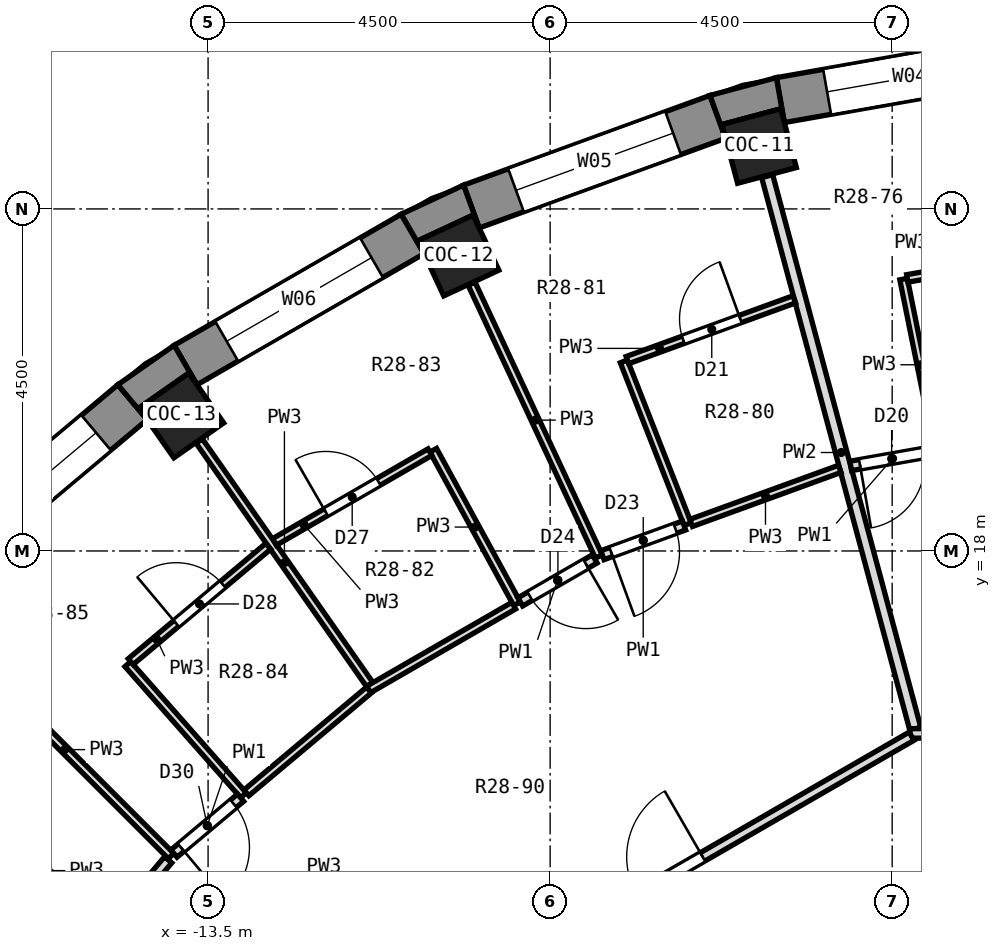
"""IFC4 building model, lengths in metres.
Left out: names, types, materials, properties, quantities, classifications, styles, units other than length and angle.
Written with IfcOpenShell. Run it as: python <this file> out.ifc"""

import sys

from ifc_helpers import new_model, si_unit, direction, frame, frame_2d, origin, origin_2d, place, context, subcontext, project, spatial, polyline, rectangle, outline, extrude, element, fill, save


model = new_model("IFC4")
c1 = context("Model", 3, precision=1e-05, world=origin(), true_north=direction((0.0, 1.0)))
c2 = subcontext(c1, "Body", "Model", "MODEL_VIEW")
j1 = project(units=[si_unit("LENGTHUNIT", "METRE"), si_unit("PLANEANGLEUNIT", "RADIAN")], contexts=[c1])
p1 = place(None, origin())
s1 = spatial("IfcSite", under=j1, at=p1, CompositionType="ELEMENT")
p2 = place(p1, origin())
s2 = spatial("IfcBuilding", under=s1, at=p2, CompositionType="ELEMENT")
p3 = place(p2, frame((0.0, 0.0, 190.5)))
s3 = spatial("IfcBuildingStorey", under=s2, at=p3, CompositionType="ELEMENT", Elevation=190.5)
for number, where, z_axis, x_axis in (
    (1, (-6.25, 23.327, 0.0), (0.0, 0.0, 1.0), (-0.259, 0.966, 0.0)),
    (2, (-10.206, 21.887, 0.0), (0.0, 0.0, 1.0), (-0.423, 0.906, 0.0)),
    (3, (-13.852, 19.782, 0.0), (0.0, 0.0, 1.0), (-0.574, 0.819, 0.0)),
):
    element("IfcColumn", number, at=place(p3, frame(where, z_axis=z_axis, x_axis=x_axis)), inside=s3, PredefinedType="COLUMN", context=c2, shape_type="SweptSolid", body=[
        extrude(rectangle(XDim=0.8, YDim=0.8, at=origin_2d()), origin(), (0.0, 0.0, 1.0), 3.3),
    ])
p4 = place(p3, frame((-2.574, 24.531, 0.0), z_axis=(0.0, 0.0, 1.0), x_axis=(-0.984814892183, -0.173607684551, 0.0)))
e4 = element("IfcWall", 4, at=p4, inside=s3, PredefinedType="SOLIDWALL", context=c2, shape_type="SweptSolid", body=[
    extrude(rectangle(XDim=3.45, YDim=0.6, at=frame_2d((1.725, 0.0))), origin(), (0.0, 0.0, 1.0), 2.85),
])
p5 = place(p4, frame((0.625, 0.0, 0.9)))
e5 = element("IfcOpeningElement", 5, at=p5, cuts=e4, PredefinedType="OPENING", context=c2, shape_type="SweptSolid", body=[
    extrude(rectangle(XDim=2.2, YDim=1.8, at=frame_2d((1.1, 0.9))), frame((0.0, 0.312, 0.0), z_axis=(0.0, -1.0, 0.0), x_axis=(1.0, 0.0, 0.0)), (0.0, 0.0, 1.0), 0.624),
])
p6 = place(p3, frame((-6.794, 23.711, 0.0), z_axis=(0.0, 0.0, 1.0), x_axis=(-0.93968799822, -0.342032843455, 0.0)))
e6 = element("IfcWall", 6, at=p6, inside=s3, PredefinedType="SOLIDWALL", context=c2, shape_type="SweptSolid", body=[
    extrude(rectangle(XDim=3.45, YDim=0.6, at=frame_2d((1.725, 0.0))), origin(), (0.0, 0.0, 1.0), 2.85),
])
p7 = place(p6, frame((0.625, 0.0, 0.9)))
e7 = element("IfcOpeningElement", 7, at=p7, cuts=e6, PredefinedType="OPENING", context=c2, shape_type="SweptSolid", body=[
    extrude(rectangle(XDim=2.2, YDim=1.8, at=frame_2d((1.1, 0.9))), frame((0.0, 0.312, 0.0), z_axis=(0.0, -1.0, 0.0), x_axis=(1.0, 0.0, 0.0)), (0.0, 0.0, 1.0), 0.624),
])
p8 = place(p3, frame((-10.809, 22.171, 0.0), z_axis=(0.0, 0.0, 1.0), x_axis=(-0.86602648383, -0.499998129301, 0.0)))
e8 = element("IfcWall", 8, at=p8, inside=s3, PredefinedType="SOLIDWALL", context=c2, shape_type="SweptSolid", body=[
    extrude(rectangle(XDim=3.45, YDim=0.6, at=frame_2d((1.725, 0.0))), origin(), (0.0, 0.0, 1.0), 2.85),
])
p9 = place(p8, frame((0.625, 0.0, 0.9)))
e9 = element("IfcOpeningElement", 9, at=p9, cuts=e8, PredefinedType="OPENING", context=c2, shape_type="SweptSolid", body=[
    extrude(rectangle(XDim=2.2, YDim=1.8, at=frame_2d((1.1, 0.9))), frame((0.0, 0.312, 0.0), z_axis=(0.0, -1.0, 0.0), x_axis=(1.0, 0.0, 0.0)), (0.0, 0.0, 1.0), 0.624),
])
p10 = place(p3, frame((-14.494, 19.957, 0.0), z_axis=(0.0, 0.0, 1.0), x_axis=(-0.766058884809, -0.642770398358, 0.0)))
e10 = element("IfcWall", 10, at=p10, inside=s3, PredefinedType="SOLIDWALL", context=c2, shape_type="SweptSolid", body=[
    extrude(rectangle(XDim=3.449, YDim=0.6, at=frame_2d((1.725, 0.0))), origin(), (0.0, 0.0, 1.0), 2.85),
])
p11 = place(p10, frame((0.625, 0.0, 0.9)))
e11 = element("IfcOpeningElement", 11, at=p11, cuts=e10, PredefinedType="OPENING", context=c2, shape_type="SweptSolid", body=[
    extrude(rectangle(XDim=2.2, YDim=1.8, at=frame_2d((1.1, 0.9))), frame((0.0, 0.312, 0.0), z_axis=(0.0, -1.0, 0.0), x_axis=(1.0, 0.0, 0.0)), (0.0, 0.0, 1.0), 0.624),
])
p12 = place(p3, origin())
e12 = element("IfcWall", 12, at=p12, inside=s3, PredefinedType="SOLIDWALL", context=c2, shape_type="SweptSolid", body=[
    extrude(outline(polyline([(-6.023, 24.227), (-6.897, 23.993), (-6.692, 23.429), (-6.74, 23.61), (-5.968, 23.817), (-5.919, 23.636), (-6.023, 24.227)])), origin(), (0.0, 0.0, 1.0), 2.85),
])
p13 = place(p3, origin())
e13 = element("IfcWall", 13, at=p13, inside=s3, PredefinedType="SOLIDWALL", context=c2, shape_type="SweptSolid", body=[
    extrude(outline(polyline([(-10.959, 22.431), (-10.659, 21.911), (-10.738, 22.081), (-10.013, 22.419), (-9.934, 22.249), (-10.139, 22.813), (-10.959, 22.431)])), origin(), (0.0, 0.0, 1.0), 2.85),
])
p14 = place(p3, origin())
e14 = element("IfcWall", 14, at=p14, inside=s3, PredefinedType="SOLIDWALL", context=c2, shape_type="SweptSolid", body=[
    extrude(outline(polyline([(-13.946, 20.706), (-14.687, 20.187), (-14.302, 19.727), (-14.409, 19.881), (-13.754, 20.34), (-13.646, 20.186), (-13.946, 20.706)])), origin(), (0.0, 0.0, 1.0), 2.85),
])
p15 = place(p3, frame((-4.35, 21.577, 0.0), z_axis=(0.0, 0.0, 1.0), x_axis=(0.197830277374, -0.980236288532, 0.0)))
e15 = element("IfcWall", 15, at=p15, inside=s3, PredefinedType="PARTITIONING", context=c2, shape_type="SweptSolid", body=[
    extrude(rectangle(XDim=2.3, YDim=0.1, at=frame_2d((1.15, 0.0))), origin(), (0.0, 0.0, 1.0), 2.85),
])
p16 = place(p3, frame((-6.145, 22.931, 0.0), z_axis=(0.0, 0.0, 1.0), x_axis=(0.258855512824, -0.965916054055, 0.0)))
e16 = element("IfcWall", 16, at=p16, inside=s3, PredefinedType="PARTITIONING", context=c2, shape_type="SweptSolid", body=[
    extrude(rectangle(XDim=7.527, YDim=0.15, at=frame_2d((3.764, 0.0))), origin(), (0.0, 0.0, 1.0), 2.85),
])
p17 = place(p3, frame((-8.03, 20.494, 0.0), z_axis=(0.0, 0.0, 1.0), x_axis=(0.364775478286, -0.931095510912, 0.0)))
e17 = element("IfcWall", 17, at=p17, inside=s3, PredefinedType="PARTITIONING", context=c2, shape_type="SweptSolid", body=[
    extrude(rectangle(XDim=2.3, YDim=0.1, at=frame_2d((1.15, 0.0))), origin(), (0.0, 0.0, 1.0), 2.85),
])
p18 = place(p3, frame((-10.033, 21.516, 0.0), z_axis=(0.0, 0.0, 1.0), x_axis=(0.422733584559, -0.90625400219, 0.0)))
e18 = element("IfcWall", 18, at=p18, inside=s3, PredefinedType="PARTITIONING", context=c2, shape_type="SweptSolid", body=[
    extrude(rectangle(XDim=3.96, YDim=0.1, at=frame_2d((1.98, 0.0))), origin(), (0.0, 0.0, 1.0), 2.85),
])
p19 = place(p3, frame((-10.538, 19.325, 0.0), z_axis=(0.0, 0.0, 1.0), x_axis=(0.478926465157, -0.877855022753, 0.0)))
e19 = element("IfcWall", 19, at=p19, inside=s3, PredefinedType="PARTITIONING", context=c2, shape_type="SweptSolid", body=[
    extrude(rectangle(XDim=2.301, YDim=0.1, at=frame_2d((1.15, 0.0))), origin(), (0.0, 0.0, 1.0), 2.85),
])
p20 = place(p3, frame((-13.617, 19.447, 0.0), z_axis=(0.0, 0.0, 1.0), x_axis=(0.573546149397, -0.819173250608, 0.0)))
e20 = element("IfcWall", 20, at=p20, inside=s3, PredefinedType="PARTITIONING", context=c2, shape_type="SweptSolid", body=[
    extrude(rectangle(XDim=3.91, YDim=0.1, at=frame_2d((1.955, 0.0))), origin(), (0.0, 0.0, 1.0), 2.85),
])
p21 = place(p3, frame((-14.556, 16.512, 0.0), z_axis=(0.0, 0.0, 1.0), x_axis=(0.661368963491, -0.750060726962, 0.0)))
e21 = element("IfcWall", 21, at=p21, inside=s3, PredefinedType="PARTITIONING", context=c2, shape_type="SweptSolid", body=[
    extrude(rectangle(XDim=2.301, YDim=0.1, at=frame_2d((1.151, 0.0))), origin(), (0.0, 0.0, 1.0), 2.85),
])
p22 = place(p3, frame((-16.787, 16.787, 0.0), z_axis=(0.0, 0.0, 1.0), x_axis=(0.707106781187, -0.707106781187, 0.0)))
e22 = element("IfcWall", 22, at=p22, inside=s3, PredefinedType="PARTITIONING", context=c2, shape_type="SweptSolid", body=[
    extrude(rectangle(XDim=3.959, YDim=0.1, at=frame_2d((1.979, 0.0))), origin(), (0.0, 0.0, 1.0), 2.85),
])
p23 = place(p3, frame((-16.512, 14.556, 0.0), z_axis=(0.0, 0.0, 1.0), x_axis=(0.750060726962, -0.661368963491, 0.0)))
e23 = element("IfcWall", 23, at=p23, inside=s3, PredefinedType="PARTITIONING", context=c2, shape_type="SweptSolid", body=[
    extrude(rectangle(XDim=2.301, YDim=0.1, at=frame_2d((1.151, 0.0))), origin(), (0.0, 0.0, 1.0), 2.85),
])
p24 = place(p3, frame((-4.267, 15.6, 0.0), z_axis=(0.0, 0.0, 1.0), x_axis=(1.0, 0.0, 0.0)))
e24 = element("IfcWall", 24, at=p24, inside=s3, PredefinedType="PARTITIONING", context=c2, shape_type="SweptSolid", body=[
    extrude(rectangle(XDim=8.384, YDim=0.125, at=frame_2d((4.192, 0.0))), origin(), (0.0, 0.0, 1.0), 2.85),
])
p25 = place(p3, frame((-5.045, 19.119, 0.0), z_axis=(0.0, 0.0, 1.0), x_axis=(0.984809932548, 0.173635816451, 0.0)))
e25 = element("IfcWall", 25, at=p25, inside=s3, PredefinedType="PARTITIONING", context=c2, shape_type="SweptSolid", body=[
    extrude(rectangle(XDim=1.118, YDim=0.125, at=frame_2d((0.559, 0.0))), origin(), (0.0, 0.0, 1.0), 2.85),
])
p26 = place(p25, frame((0.122, 0.0, 0.0)))
e26 = element("IfcOpeningElement", 26, at=p26, cuts=e25, PredefinedType="OPENING", context=c2, shape_type="SweptSolid", body=[
    extrude(rectangle(XDim=0.85, YDim=2.1, at=frame_2d((0.425, 1.05))), frame((0.0, 0.074, 0.0), z_axis=(0.0, -1.0, 0.0), x_axis=(1.0, 0.0, 0.0)), (0.0, 0.0, 1.0), 0.149),
])
p27 = place(p3, frame((-4.301, 21.586, 0.0), z_axis=(0.0, 0.0, 1.0), x_axis=(0.984779397408, 0.173808913582, 0.0)))
e27 = element("IfcWall", 27, at=p27, inside=s3, PredefinedType="PARTITIONING", context=c2, shape_type="SweptSolid", body=[
    extrude(rectangle(XDim=2.363, YDim=0.1, at=frame_2d((1.181, 0.0))), origin(), (0.0, 0.0, 1.0), 2.85),
])
p28 = place(p27, frame((0.781, 0.0, 0.0)))
e28 = element("IfcOpeningElement", 28, at=p28, cuts=e27, PredefinedType="OPENING", context=c2, shape_type="SweptSolid", body=[
    extrude(rectangle(XDim=0.8, YDim=2.1, at=frame_2d((0.4, 1.05))), frame((0.0, 0.062, 0.0), z_axis=(0.0, -1.0, 0.0), x_axis=(1.0, 0.0, 0.0)), (0.0, 0.0, 1.0), 0.124),
])
p29 = place(p3, frame((-7.144, 18.369, 0.0), z_axis=(0.0, 0.0, 1.0), x_axis=(0.939728291625, 0.341922122596, 0.0)))
e29 = element("IfcWall", 29, at=p29, inside=s3, PredefinedType="PARTITIONING", context=c2, shape_type="SweptSolid", body=[
    extrude(rectangle(XDim=2.08, YDim=0.1, at=frame_2d((1.04, 0.0))), origin(), (0.0, 0.0, 1.0), 2.85),
])
p30 = place(p3, frame((-8.312, 17.944, 0.0), z_axis=(0.0, 0.0, 1.0), x_axis=(0.939699833517, 0.34200032586, 0.0)))
e30 = element("IfcWall", 30, at=p30, inside=s3, PredefinedType="PARTITIONING", context=c2, shape_type="SweptSolid", body=[
    extrude(rectangle(XDim=1.143, YDim=0.125, at=frame_2d((0.571, 0.0))), origin(), (0.0, 0.0, 1.0), 2.85),
])
p31 = place(p30, frame((0.122, 0.0, 0.0)))
e31 = element("IfcOpeningElement", 31, at=p31, cuts=e30, PredefinedType="OPENING", context=c2, shape_type="SweptSolid", body=[
    extrude(rectangle(XDim=0.9, YDim=2.1, at=frame_2d((0.45, 1.05))), frame((0.0, 0.074, 0.0), z_axis=(0.0, -1.0, 0.0), x_axis=(1.0, 0.0, 0.0)), (0.0, 0.0, 1.0), 0.149),
])
p32 = place(p3, frame((-7.983, 20.511, 0.0), z_axis=(0.0, 0.0, 1.0), x_axis=(0.939652995513, 0.342128993251, 0.0)))
e32 = element("IfcWall", 32, at=p32, inside=s3, PredefinedType="PARTITIONING", context=c2, shape_type="SweptSolid", body=[
    extrude(rectangle(XDim=2.336, YDim=0.1, at=frame_2d((1.168, 0.0))), origin(), (0.0, 0.0, 1.0), 2.85),
])
p33 = place(p32, frame((0.781, 0.0, 0.0)))
e33 = element("IfcOpeningElement", 33, at=p33, cuts=e32, PredefinedType="OPENING", context=c2, shape_type="SweptSolid", body=[
    extrude(rectangle(XDim=0.8, YDim=2.1, at=frame_2d((0.4, 1.05))), frame((0.0, 0.062, 0.0), z_axis=(0.0, -1.0, 0.0), x_axis=(1.0, 0.0, 0.0)), (0.0, 0.0, 1.0), 0.124),
])
p34 = place(p3, frame((-11.482, 11.384, 0.0), z_axis=(0.0, 0.0, 1.0), x_axis=(0.866032345022, 0.499987977232, 0.0)))
e34 = element("IfcWall", 34, at=p34, inside=s3, PredefinedType="PARTITIONING", context=c2, shape_type="SweptSolid", body=[
    extrude(rectangle(XDim=8.357, YDim=0.125, at=frame_2d((4.179, 0.0))), origin(), (0.0, 0.0, 1.0), 2.85),
])
p35 = place(p34, frame((4.184, 0.0, 0.0)))
e35 = element("IfcOpeningElement", 35, at=p35, cuts=e34, PredefinedType="OPENING", context=c2, shape_type="SweptSolid", body=[
    extrude(rectangle(XDim=1.0, YDim=2.1, at=frame_2d((0.5, 1.05))), frame((0.0, 0.074, 0.0), z_axis=(0.0, -1.0, 0.0), x_axis=(1.0, 0.0, 0.0)), (0.0, 0.0, 1.0), 0.149),
])
p36 = place(p3, frame((-11.389, 16.178, 0.0), z_axis=(0.0, 0.0, 1.0), x_axis=(0.866074964767, 0.499914148034, 0.0)))
e36 = element("IfcWall", 36, at=p36, inside=s3, PredefinedType="PARTITIONING", context=c2, shape_type="SweptSolid", body=[
    extrude(rectangle(XDim=2.205, YDim=0.1, at=frame_2d((1.103, 0.0))), origin(), (0.0, 0.0, 1.0), 2.85),
])
p37 = place(p3, frame((-9.393, 17.33, 0.0), z_axis=(0.0, 0.0, 1.0), x_axis=(0.866016678684, 0.500015112013, 0.0)))
e37 = element("IfcWall", 37, at=p37, inside=s3, PredefinedType="PARTITIONING", context=c2, shape_type="SweptSolid", body=[
    extrude(rectangle(XDim=1.131, YDim=0.125, at=frame_2d((0.566, 0.0))), origin(), (0.0, 0.0, 1.0), 2.85),
])
p38 = place(p37, frame((0.147, 0.0, 0.0)))
e38 = element("IfcOpeningElement", 38, at=p38, cuts=e37, PredefinedType="OPENING", context=c2, shape_type="SweptSolid", body=[
    extrude(rectangle(XDim=0.85, YDim=2.1, at=frame_2d((0.425, 1.05))), frame((0.0, 0.074, 0.0), z_axis=(0.0, -1.0, 0.0), x_axis=(1.0, 0.0, 0.0)), (0.0, 0.0, 1.0), 0.149),
])
p39 = place(p3, frame((-12.627, 18.119, 0.0), z_axis=(0.0, 0.0, 1.0), x_axis=(0.865982457891, 0.500074377092, 0.0)))
e39 = element("IfcWall", 39, at=p39, inside=s3, PredefinedType="PARTITIONING", context=c2, shape_type="SweptSolid", body=[
    extrude(rectangle(XDim=2.362, YDim=0.1, at=frame_2d((1.181, 0.0))), origin(), (0.0, 0.0, 1.0), 2.85),
])
p40 = place(p39, frame((0.781, 0.0, 0.0)))
e40 = element("IfcOpeningElement", 40, at=p40, cuts=e39, PredefinedType="OPENING", context=c2, shape_type="SweptSolid", body=[
    extrude(rectangle(XDim=0.8, YDim=2.1, at=frame_2d((0.4, 1.05))), frame((0.0, 0.062, 0.0), z_axis=(0.0, -1.0, 0.0), x_axis=(1.0, 0.0, 0.0)), (0.0, 0.0, 1.0), 0.124),
])
p41 = place(p3, frame((-12.996, 14.818, 0.0), z_axis=(0.0, 0.0, 1.0), x_axis=(0.766068087891, 0.642759429892, 0.0)))
e41 = element("IfcWall", 41, at=p41, inside=s3, PredefinedType="PARTITIONING", context=c2, shape_type="SweptSolid", body=[
    extrude(rectangle(XDim=2.105, YDim=0.1, at=frame_2d((1.052, 0.0))), origin(), (0.0, 0.0, 1.0), 2.85),
])
p42 = place(p3, frame((-13.949, 14.019, 0.0), z_axis=(0.0, 0.0, 1.0), x_axis=(0.766293239505, 0.642490989111, 0.0)))
e42 = element("IfcWall", 42, at=p42, inside=s3, PredefinedType="PARTITIONING", context=c2, shape_type="SweptSolid", body=[
    extrude(rectangle(XDim=1.144, YDim=0.125, at=frame_2d((0.572, 0.0))), origin(), (0.0, 0.0, 1.0), 2.85),
])
p43 = place(p42, frame((0.122, 0.0, 0.0)))
e43 = element("IfcOpeningElement", 43, at=p43, cuts=e42, PredefinedType="OPENING", context=c2, shape_type="SweptSolid", body=[
    extrude(rectangle(XDim=0.9, YDim=2.1, at=frame_2d((0.45, 1.05))), frame((0.0, 0.074, 0.0), z_axis=(0.0, -1.0, 0.0), x_axis=(1.0, 0.0, 0.0)), (0.0, 0.0, 1.0), 0.149),
])
p44 = place(p3, frame((-14.518, 16.544, 0.0), z_axis=(0.0, 0.0, 1.0), x_axis=(0.766175122772, 0.642631839583, 0.0)))
e44 = element("IfcWall", 44, at=p44, inside=s3, PredefinedType="PARTITIONING", context=c2, shape_type="SweptSolid", body=[
    extrude(rectangle(XDim=2.362, YDim=0.1, at=frame_2d((1.181, 0.0))), origin(), (0.0, 0.0, 1.0), 2.85),
])
p45 = place(p44, frame((0.781, 0.0, 0.0)))
e45 = element("IfcOpeningElement", 45, at=p45, cuts=e44, PredefinedType="OPENING", context=c2, shape_type="SweptSolid", body=[
    extrude(rectangle(XDim=0.8, YDim=2.1, at=frame_2d((0.4, 1.05))), frame((0.0, 0.062, 0.0), z_axis=(0.0, -1.0, 0.0), x_axis=(1.0, 0.0, 0.0)), (0.0, 0.0, 1.0), 0.124),
])
p46 = place(p3, frame((-14.754, 13.072, 0.0), z_axis=(0.0, 0.0, 1.0), x_axis=(0.644208847233, 0.76484963303, 0.0)))
e46 = element("IfcWall", 46, at=p46, inside=s3, PredefinedType="PARTITIONING", context=c2, shape_type="SweptSolid", body=[
    extrude(rectangle(XDim=1.131, YDim=0.125, at=frame_2d((0.566, 0.0))), origin(), (0.0, 0.0, 1.0), 2.85),
])
p47 = place(p5, origin())
e47 = element("IfcWindow", 47, at=p47, inside=s3, PartitioningType="SINGLE_PANEL", PredefinedType="WINDOW", context=c2, shape_type="SweptSolid", body=[
    extrude(rectangle(XDim=2.2, YDim=1.8, at=frame_2d((1.1, 0.9))), frame((0.0, 0.18, 0.0), z_axis=(0.0, -1.0, 0.0), x_axis=(1.0, 0.0, 0.0)), (0.0, 0.0, 1.0), 0.06),
])
fill(e5, e47)
p48 = place(p7, origin())
e48 = element("IfcWindow", 48, at=p48, inside=s3, PartitioningType="SINGLE_PANEL", PredefinedType="WINDOW", context=c2, shape_type="SweptSolid", body=[
    extrude(rectangle(XDim=2.2, YDim=1.8, at=frame_2d((1.1, 0.9))), frame((0.0, 0.18, 0.0), z_axis=(0.0, -1.0, 0.0), x_axis=(1.0, 0.0, 0.0)), (0.0, 0.0, 1.0), 0.06),
])
fill(e7, e48)
p49 = place(p9, origin())
e49 = element("IfcWindow", 49, at=p49, inside=s3, PartitioningType="SINGLE_PANEL", PredefinedType="WINDOW", context=c2, shape_type="SweptSolid", body=[
    extrude(rectangle(XDim=2.2, YDim=1.8, at=frame_2d((1.1, 0.9))), frame((0.0, 0.18, 0.0), z_axis=(0.0, -1.0, 0.0), x_axis=(1.0, 0.0, 0.0)), (0.0, 0.0, 1.0), 0.06),
])
fill(e9, e49)
p50 = place(p11, origin())
e50 = element("IfcWindow", 50, at=p50, inside=s3, PartitioningType="SINGLE_PANEL", PredefinedType="WINDOW", context=c2, shape_type="SweptSolid", body=[
    extrude(rectangle(XDim=2.2, YDim=1.8, at=frame_2d((1.1, 0.9))), frame((0.0, 0.18, 0.0), z_axis=(0.0, -1.0, 0.0), x_axis=(1.0, 0.0, 0.0)), (0.0, 0.0, 1.0), 0.06),
])
fill(e11, e50)
p51 = place(p26, frame((0.85, 0.0, 0.0), z_axis=(0.0, 0.0, 1.0), x_axis=(-1.0, 0.0, 0.0)))
e51 = element("IfcDoor", 51, at=p51, inside=s3, OperationType="SINGLE_SWING_RIGHT", PredefinedType="DOOR", context=c2, shape_type="SweptSolid", body=[
    extrude(rectangle(XDim=0.85, YDim=2.1, at=frame_2d((0.425, 1.05))), frame((0.0, 0.025, 0.0), z_axis=(0.0, -1.0, 0.0), x_axis=(1.0, 0.0, 0.0)), (0.0, 0.0, 1.0), 0.05),
])
fill(e26, e51)
p52 = place(p33, origin())
e52 = element("IfcDoor", 52, at=p52, inside=s3, OperationType="SINGLE_SWING_RIGHT", PredefinedType="DOOR", context=c2, shape_type="SweptSolid", body=[
    extrude(rectangle(XDim=0.8, YDim=2.1, at=frame_2d((0.4, 1.05))), frame((0.0, 0.025, 0.0), z_axis=(0.0, -1.0, 0.0), x_axis=(1.0, 0.0, 0.0)), (0.0, 0.0, 1.0), 0.05),
])
fill(e33, e52)
p53 = place(p31, frame((0.9, 0.0, 0.0), z_axis=(0.0, 0.0, 1.0), x_axis=(-1.0, 0.0, 0.0)))
e53 = element("IfcDoor", 53, at=p53, inside=s3, OperationType="SINGLE_SWING_RIGHT", PredefinedType="DOOR", context=c2, shape_type="SweptSolid", body=[
    extrude(rectangle(XDim=0.9, YDim=2.1, at=frame_2d((0.45, 1.05))), frame((0.0, 0.025, 0.0), z_axis=(0.0, -1.0, 0.0), x_axis=(1.0, 0.0, 0.0)), (0.0, 0.0, 1.0), 0.05),
])
fill(e31, e53)
p54 = place(p38, frame((0.85, 0.0, 0.0), z_axis=(0.0, 0.0, 1.0), x_axis=(-1.0, 0.0, 0.0)))
e54 = element("IfcDoor", 54, at=p54, inside=s3, OperationType="SINGLE_SWING_LEFT", PredefinedType="DOOR", context=c2, shape_type="SweptSolid", body=[
    extrude(rectangle(XDim=0.85, YDim=2.1, at=frame_2d((0.425, 1.05))), frame((0.0, 0.025, 0.0), z_axis=(0.0, -1.0, 0.0), x_axis=(1.0, 0.0, 0.0)), (0.0, 0.0, 1.0), 0.05),
])
fill(e38, e54)
p55 = place(p35, origin())
e55 = element("IfcDoor", 55, at=p55, inside=s3, OperationType="SINGLE_SWING_RIGHT", PredefinedType="DOOR", context=c2, shape_type="SweptSolid", body=[
    extrude(rectangle(XDim=1.0, YDim=2.1, at=frame_2d((0.5, 1.05))), frame((0.0, 0.025, 0.0), z_axis=(0.0, -1.0, 0.0), x_axis=(1.0, 0.0, 0.0)), (0.0, 0.0, 1.0), 0.05),
])
fill(e35, e55)
p56 = place(p40, origin())
e56 = element("IfcDoor", 56, at=p56, inside=s3, OperationType="SINGLE_SWING_LEFT", PredefinedType="DOOR", context=c2, shape_type="SweptSolid", body=[
    extrude(rectangle(XDim=0.8, YDim=2.1, at=frame_2d((0.4, 1.05))), frame((0.0, 0.025, 0.0), z_axis=(0.0, -1.0, 0.0), x_axis=(1.0, 0.0, 0.0)), (0.0, 0.0, 1.0), 0.05),
])
fill(e40, e56)
p57 = place(p45, origin())
e57 = element("IfcDoor", 57, at=p57, inside=s3, OperationType="SINGLE_SWING_LEFT", PredefinedType="DOOR", context=c2, shape_type="SweptSolid", body=[
    extrude(rectangle(XDim=0.8, YDim=2.1, at=frame_2d((0.4, 1.05))), frame((0.0, 0.025, 0.0), z_axis=(0.0, -1.0, 0.0), x_axis=(1.0, 0.0, 0.0)), (0.0, 0.0, 1.0), 0.05),
])
fill(e45, e57)
p58 = place(p43, frame((0.9, 0.0, 0.0), z_axis=(0.0, 0.0, 1.0), x_axis=(-1.0, 0.0, 0.0)))
e58 = element("IfcDoor", 58, at=p58, inside=s3, OperationType="SINGLE_SWING_RIGHT", PredefinedType="DOOR", context=c2, shape_type="SweptSolid", body=[
    extrude(rectangle(XDim=0.9, YDim=2.1, at=frame_2d((0.45, 1.05))), frame((0.0, 0.025, 0.0), z_axis=(0.0, -1.0, 0.0), x_axis=(1.0, 0.0, 0.0)), (0.0, 0.0, 1.0), 0.05),
])
fill(e43, e58)
save(model, sys.argv[1])
